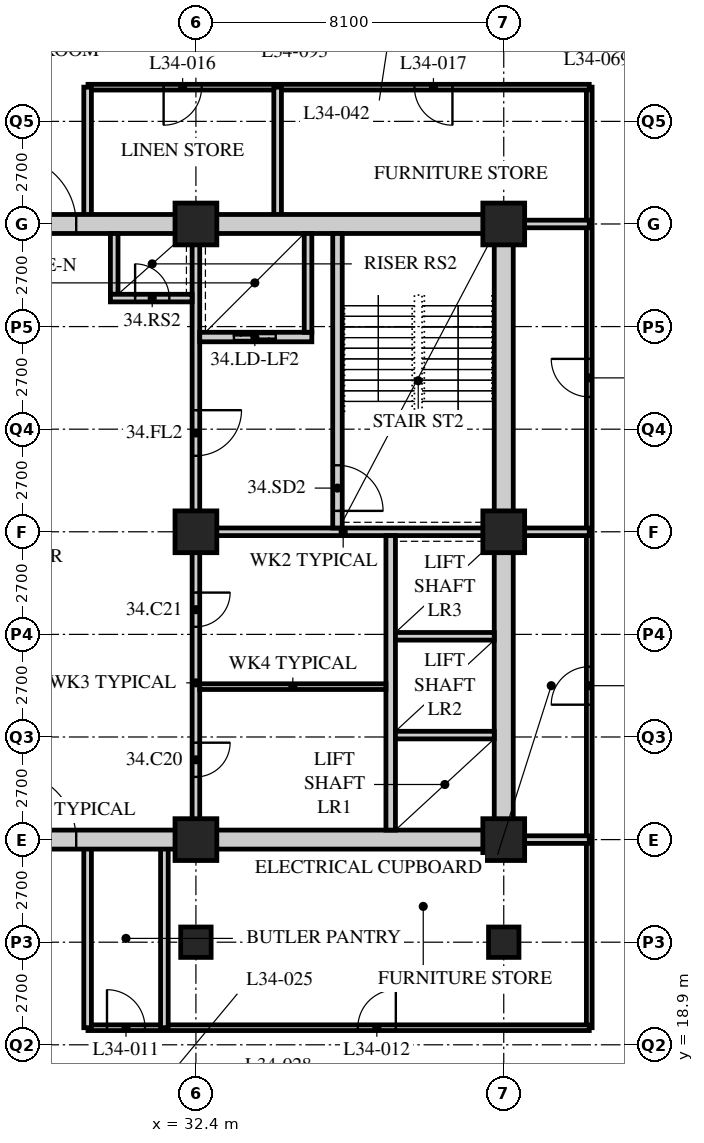
"""IFC4 building model, lengths in metres.
Left out: names, types, materials, properties, quantities, classifications, styles, units other than length and angle.
Written with IfcOpenShell. Run it as: python <this file> out.ifc"""

import sys

from ifc_helpers import new_model, si_unit, direction, frame, frame_2d, origin, origin_2d, place, context, subcontext, project, spatial, rectangle, hollow_rectangle, extrude, element, fill, save


model = new_model("IFC4")
c1 = context("Model", 3, precision=1e-05, world=origin(), true_north=direction((0.0, 1.0)))
c2 = subcontext(c1, "Body", "Model", "MODEL_VIEW")
j1 = project(units=[si_unit("LENGTHUNIT", "METRE"), si_unit("PLANEANGLEUNIT", "RADIAN")], contexts=[c1])
p1 = place(None, origin())
s1 = spatial("IfcSite", under=j1, at=p1, CompositionType="ELEMENT")
p2 = place(p1, origin())
s2 = spatial("IfcBuilding", under=s1, at=p2, CompositionType="ELEMENT")
p3 = place(p2, frame((0.0, 0.0, 134.0)))
s3 = spatial("IfcBuildingStorey", under=s2, at=p3, CompositionType="ELEMENT", Elevation=134.0)
p4 = place(p3, frame((32.4, 21.6, 0.0), z_axis=(0.0, 0.0, 1.0), x_axis=(1.0, 0.0, 0.0)))
e1 = element("IfcColumn", 1, at=p4, inside=s3, PredefinedType="COLUMN", context=c2, shape_type="SweptSolid", body=[
    extrude(hollow_rectangle(XDim=0.8, YDim=0.8, WallThickness=0.08, at=origin_2d()), origin(), (0.0, 0.0, 1.0), 3.4),
])
for number, where, z_axis, x_axis in (
    (2, (32.4, 24.3, 0.0), (0.0, 0.0, 1.0), (1.0, 0.0, 0.0)),
    (3, (32.4, 32.4, 0.0), (0.0, 0.0, 1.0), (1.0, 0.0, 0.0)),
    (4, (32.4, 40.5, 0.0), (0.0, 0.0, 1.0), (1.0, 0.0, 0.0)),
):
    element("IfcColumn", number, at=place(p3, frame(where, z_axis=z_axis, x_axis=x_axis)), inside=s3, PredefinedType="COLUMN", context=c2, shape_type="SweptSolid", body=[
        extrude(hollow_rectangle(XDim=1.1, YDim=1.1, WallThickness=0.1, at=origin_2d()), origin(), (0.0, 0.0, 1.0), 3.4),
    ])
p5 = place(p3, frame((40.5, 21.6, 0.0), z_axis=(0.0, 0.0, 1.0), x_axis=(1.0, 0.0, 0.0)))
e5 = element("IfcColumn", 5, at=p5, inside=s3, PredefinedType="COLUMN", context=c2, shape_type="SweptSolid", body=[
    extrude(hollow_rectangle(XDim=0.8, YDim=0.8, WallThickness=0.08, at=origin_2d()), origin(), (0.0, 0.0, 1.0), 3.4),
])
for number, where, z_axis, x_axis in (
    (6, (40.5, 24.3, 0.0), (0.0, 0.0, 1.0), (1.0, 0.0, 0.0)),
    (7, (40.5, 32.4, 0.0), (0.0, 0.0, 1.0), (1.0, 0.0, 0.0)),
    (8, (40.5, 40.5, 0.0), (0.0, 0.0, 1.0), (1.0, 0.0, 0.0)),
):
    element("IfcColumn", number, at=place(p3, frame(where, z_axis=z_axis, x_axis=x_axis)), inside=s3, PredefinedType="COLUMN", context=c2, shape_type="SweptSolid", body=[
        extrude(hollow_rectangle(XDim=1.1, YDim=1.1, WallThickness=0.1, at=origin_2d()), origin(), (0.0, 0.0, 1.0), 3.4),
    ])
p6 = place(p3, frame((42.75, 19.35, 0.0), z_axis=(0.0, 0.0, 1.0), x_axis=(0.0, 1.0, 0.0)))
e9 = element("IfcWall", 9, at=p6, inside=s3, PredefinedType="PARTITIONING", context=c2, shape_type="SweptSolid", body=[
    extrude(rectangle(XDim=24.75, YDim=0.15, at=frame_2d((12.375, 0.0))), origin(), (0.0, 0.0, 1.0), 3.19),
])
p7 = place(p6, frame((8.5, 0.0, 0.0)))
e10 = element("IfcOpeningElement", 10, at=p7, cuts=e9, PredefinedType="OPENING", context=c2, shape_type="SweptSolid", body=[
    extrude(rectangle(XDim=1.0, YDim=2.1, at=frame_2d((0.5, 1.05))), frame((0.0, 0.085, 0.0), z_axis=(0.0, -1.0, 0.0), x_axis=(1.0, 0.0, 0.0)), (0.0, 0.0, 1.0), 0.17),
])
p8 = place(p6, frame((16.6, 0.0, 0.0)))
e11 = element("IfcOpeningElement", 11, at=p8, cuts=e9, PredefinedType="OPENING", context=c2, shape_type="SweptSolid", body=[
    extrude(rectangle(XDim=1.0, YDim=2.1, at=frame_2d((0.5, 1.05))), frame((0.0, 0.085, 0.0), z_axis=(0.0, -1.0, 0.0), x_axis=(1.0, 0.0, 0.0)), (0.0, 0.0, 1.0), 0.17),
])
p9 = place(p3, frame((42.75, 44.1, 0.0), z_axis=(0.0, 0.0, 1.0), x_axis=(-1.0, 0.0, 0.0)))
e12 = element("IfcWall", 12, at=p9, inside=s3, PredefinedType="PARTITIONING", context=c2, shape_type="SweptSolid", body=[
    extrude(rectangle(XDim=13.19, YDim=0.15, at=frame_2d((6.595, 0.0))), origin(), (0.0, 0.0, 1.0), 3.19),
])
p10 = place(p9, frame((10.2, 0.0, 0.0)))
e13 = element("IfcOpeningElement", 13, at=p10, cuts=e12, PredefinedType="OPENING", context=c2, shape_type="SweptSolid", body=[
    extrude(rectangle(XDim=1.0, YDim=2.1, at=frame_2d((0.5, 1.05))), frame((0.0, 0.085, 0.0), z_axis=(0.0, -1.0, 0.0), x_axis=(1.0, 0.0, 0.0)), (0.0, 0.0, 1.0), 0.17),
])
p11 = place(p9, frame((3.6, 0.0, 0.0)))
e14 = element("IfcOpeningElement", 14, at=p11, cuts=e12, PredefinedType="OPENING", context=c2, shape_type="SweptSolid", body=[
    extrude(rectangle(XDim=1.0, YDim=2.1, at=frame_2d((0.5, 1.05))), frame((0.0, 0.085, 0.0), z_axis=(0.0, -1.0, 0.0), x_axis=(1.0, 0.0, 0.0)), (0.0, 0.0, 1.0), 0.17),
])
p12 = place(p3, frame((29.56, 19.35, 0.0), z_axis=(0.0, 0.0, 1.0), x_axis=(1.0, 0.0, 0.0)))
e15 = element("IfcWall", 15, at=p12, inside=s3, PredefinedType="PARTITIONING", context=c2, shape_type="SweptSolid", body=[
    extrude(rectangle(XDim=13.19, YDim=0.15, at=frame_2d((6.595, 0.0))), origin(), (0.0, 0.0, 1.0), 3.19),
])
p13 = place(p12, frame((0.5, 0.0, 0.0)))
e16 = element("IfcOpeningElement", 16, at=p13, cuts=e15, PredefinedType="OPENING", context=c2, shape_type="SweptSolid", body=[
    extrude(rectangle(XDim=1.0, YDim=2.1, at=frame_2d((0.5, 1.05))), frame((0.0, 0.085, 0.0), z_axis=(0.0, -1.0, 0.0), x_axis=(1.0, 0.0, 0.0)), (0.0, 0.0, 1.0), 0.17),
])
p14 = place(p12, frame((7.1, 0.0, 0.0)))
e17 = element("IfcOpeningElement", 17, at=p14, cuts=e15, PredefinedType="OPENING", context=c2, shape_type="SweptSolid", body=[
    extrude(rectangle(XDim=1.0, YDim=2.1, at=frame_2d((0.5, 1.05))), frame((0.0, 0.085, 0.0), z_axis=(0.0, -1.0, 0.0), x_axis=(1.0, 0.0, 0.0)), (0.0, 0.0, 1.0), 0.17),
])
p15 = place(p3, frame((40.5, 32.4, 0.0), z_axis=(0.0, 0.0, 1.0), x_axis=(1.0, 0.0, 0.0)))
e18 = element("IfcWall", 18, at=p15, inside=s3, PredefinedType="SOLIDWALL", context=c2, shape_type="SweptSolid", body=[
    extrude(rectangle(XDim=2.25, YDim=0.2, at=frame_2d((1.125, 0.0))), origin(), (0.0, 0.0, 1.0), 3.19),
])
for number, where, z_axis, x_axis in (
    (19, (31.57, 19.35, 0.0), (0.0, 0.0, 1.0), (0.0, 1.0, 0.0)),
    (20, (29.55, 19.35, 0.0), (0.0, 0.0, 1.0), (0.0, 1.0, 0.0)),
):
    element("IfcWall", number, at=place(p3, frame(where, z_axis=z_axis, x_axis=x_axis)), inside=s3, PredefinedType="SOLIDWALL", context=c2, shape_type="SweptSolid", body=[
        extrude(rectangle(XDim=4.95, YDim=0.2, at=frame_2d((2.475, 0.0))), origin(), (0.0, 0.0, 1.0), 3.19),
    ])
for number, where, z_axis, x_axis in (
    (21, (34.55, 44.1, 0.0), (0.0, 0.0, 1.0), (0.0, -1.0, 0.0)),
    (22, (29.55, 40.5, 0.0), (0.0, 0.0, 1.0), (0.0, 1.0, 0.0)),
):
    element("IfcWall", number, at=place(p3, frame(where, z_axis=z_axis, x_axis=x_axis)), inside=s3, PredefinedType="SOLIDWALL", context=c2, shape_type="SweptSolid", body=[
        extrude(rectangle(XDim=3.6, YDim=0.2, at=frame_2d((1.8, 0.0))), origin(), (0.0, 0.0, 1.0), 3.19),
    ])
for number, where, z_axis, x_axis in (
    (23, (40.5, 24.3, 0.0), (0.0, 0.0, 1.0), (1.0, 0.0, 0.0)),
    (24, (40.5, 40.5, 0.0), (0.0, 0.0, 1.0), (1.0, 0.0, 0.0)),
):
    element("IfcWall", number, at=place(p3, frame(where, z_axis=z_axis, x_axis=x_axis)), inside=s3, PredefinedType="SOLIDWALL", context=c2, shape_type="SweptSolid", body=[
        extrude(rectangle(XDim=2.25, YDim=0.2, at=frame_2d((1.125, 0.0))), origin(), (0.0, 0.0, 1.0), 3.19),
    ])
p16 = place(p3, frame((15.95, 24.3, 0.0), z_axis=(0.0, 0.0, 1.0), x_axis=(1.0, 0.0, 0.0)))
e25 = element("IfcWall", 25, at=p16, inside=s3, PredefinedType="SOLIDWALL", context=c2, shape_type="SweptSolid", body=[
    extrude(rectangle(XDim=24.8, YDim=0.5, at=frame_2d((12.4, 0.0))), origin(), (0.0, 0.0, 1.0), 2.54),
])
p17 = place(p16, frame((11.5, 0.0, 0.0)))
e26 = element("IfcOpeningElement", 26, at=p17, cuts=e25, PredefinedType="OPENING", context=c2, shape_type="SweptSolid", body=[
    extrude(rectangle(XDim=1.8, YDim=2.4, at=frame_2d((0.9, 1.2))), frame((0.0, 0.26, 0.0), z_axis=(0.0, -1.0, 0.0), x_axis=(1.0, 0.0, 0.0)), (0.0, 0.0, 1.0), 0.52),
])
p18 = place(p3, frame((15.95, 40.5, 0.0), z_axis=(0.0, 0.0, 1.0), x_axis=(1.0, 0.0, 0.0)))
e27 = element("IfcWall", 27, at=p18, inside=s3, PredefinedType="SOLIDWALL", context=c2, shape_type="SweptSolid", body=[
    extrude(rectangle(XDim=24.8, YDim=0.5, at=frame_2d((12.4, 0.0))), origin(), (0.0, 0.0, 1.0), 2.54),
])
p19 = place(p18, frame((11.5, 0.0, 0.0)))
e28 = element("IfcOpeningElement", 28, at=p19, cuts=e27, PredefinedType="OPENING", context=c2, shape_type="SweptSolid", body=[
    extrude(rectangle(XDim=1.8, YDim=2.4, at=frame_2d((0.9, 1.2))), frame((0.0, 0.26, 0.0), z_axis=(0.0, -1.0, 0.0), x_axis=(1.0, 0.0, 0.0)), (0.0, 0.0, 1.0), 0.52),
])
p20 = place(p3, frame((40.5, 24.55, 0.0), z_axis=(0.0, 0.0, 1.0), x_axis=(0.0, 1.0, 0.0)))
e29 = element("IfcWall", 29, at=p20, inside=s3, PredefinedType="SOLIDWALL", context=c2, shape_type="SweptSolid", body=[
    extrude(rectangle(XDim=15.7, YDim=0.5, at=frame_2d((7.85, 0.0))), origin(), (0.0, 0.0, 1.0), 2.578),
])
p21 = place(p3, frame((32.3, 32.4, 0.0), z_axis=(0.0, 0.0, 1.0), x_axis=(1.0, 0.0, 0.0)))
e30 = element("IfcWall", 30, at=p21, inside=s3, PredefinedType="SOLIDWALL", context=c2, shape_type="SweptSolid", body=[
    extrude(rectangle(XDim=7.95, YDim=0.2, at=frame_2d((3.975, 0.0))), origin(), (0.0, 0.0, 1.0), 2.578),
])
p22 = place(p3, frame((32.4, 32.5, 0.0), z_axis=(0.0, 0.0, 1.0), x_axis=(0.0, 1.0, 0.0)))
e31 = element("IfcWall", 31, at=p22, inside=s3, PredefinedType="SOLIDWALL", context=c2, shape_type="SweptSolid", body=[
    extrude(rectangle(XDim=7.75, YDim=0.2, at=frame_2d((3.875, 0.0))), origin(), (0.0, 0.0, 1.0), 2.578),
])
p23 = place(p22, frame((1.9, 0.0, 0.0)))
e32 = element("IfcOpeningElement", 32, at=p23, cuts=e31, PredefinedType="OPENING", context=c2, shape_type="SweptSolid", body=[
    extrude(rectangle(XDim=1.2, YDim=2.1, at=frame_2d((0.6, 1.05))), frame((0.0, 0.11, 0.0), z_axis=(0.0, -1.0, 0.0), x_axis=(1.0, 0.0, 0.0)), (0.0, 0.0, 1.0), 0.22),
])
p24 = place(p3, frame((37.525, 24.55, 0.0), z_axis=(0.0, 0.0, 1.0), x_axis=(0.0, 1.0, 0.0)))
e33 = element("IfcWall", 33, at=p24, inside=s3, PredefinedType="SOLIDWALL", context=c2, shape_type="SweptSolid", body=[
    extrude(rectangle(XDim=7.75, YDim=0.25, at=frame_2d((3.875, 0.0))), origin(), (0.0, 0.0, 1.0), 3.19),
])
for number, where, z_axis, x_axis in (
    (34, (37.65, 27.05, 0.0), (0.0, 0.0, 1.0), (1.0, 0.0, 0.0)),
    (35, (37.65, 29.65, 0.0), (0.0, 0.0, 1.0), (1.0, 0.0, 0.0)),
):
    element("IfcWall", number, at=place(p3, frame(where, z_axis=z_axis, x_axis=x_axis)), inside=s3, PredefinedType="SOLIDWALL", context=c2, shape_type="SweptSolid", body=[
        extrude(rectangle(XDim=2.6, YDim=0.2, at=frame_2d((1.3, 0.0))), origin(), (0.0, 0.0, 1.0), 3.19),
    ])
p25 = place(p3, frame((36.125, 32.5, 0.0), z_axis=(0.0, 0.0, 1.0), x_axis=(0.0, 1.0, 0.0)))
e36 = element("IfcWall", 36, at=p25, inside=s3, PredefinedType="SOLIDWALL", context=c2, shape_type="SweptSolid", body=[
    extrude(rectangle(XDim=7.75, YDim=0.25, at=frame_2d((3.875, 0.0))), origin(), (0.0, 0.0, 1.0), 3.19),
])
p26 = place(p25, frame((0.45, 0.0, 0.0)))
e37 = element("IfcOpeningElement", 37, at=p26, cuts=e36, PredefinedType="OPENING", context=c2, shape_type="SweptSolid", body=[
    extrude(rectangle(XDim=1.2, YDim=2.1, at=frame_2d((0.6, 1.05))), frame((0.0, 0.135, 0.0), z_axis=(0.0, -1.0, 0.0), x_axis=(1.0, 0.0, 0.0)), (0.0, 0.0, 1.0), 0.27),
])
p27 = place(p3, frame((32.5, 37.525, 0.0), z_axis=(0.0, 0.0, 1.0), x_axis=(1.0, 0.0, 0.0)))
e38 = element("IfcWall", 38, at=p27, inside=s3, PredefinedType="SOLIDWALL", context=c2, shape_type="SweptSolid", body=[
    extrude(rectangle(XDim=2.95, YDim=0.25, at=frame_2d((1.475, 0.0))), origin(), (0.0, 0.0, 1.0), 3.19),
])
p28 = place(p27, frame((0.9, 0.0, 0.0)))
e39 = element("IfcOpeningElement", 39, at=p28, cuts=e38, PredefinedType="OPENING", context=c2, shape_type="SweptSolid", body=[
    extrude(rectangle(XDim=1.1, YDim=2.4, at=frame_2d((0.55, 1.2))), frame((0.0, 0.135, 0.0), z_axis=(0.0, -1.0, 0.0), x_axis=(1.0, 0.0, 0.0)), (0.0, 0.0, 1.0), 0.27),
])
p29 = place(p3, frame((35.35, 37.65, 0.0), z_axis=(0.0, 0.0, 1.0), x_axis=(0.0, 1.0, 0.0)))
e40 = element("IfcWall", 40, at=p29, inside=s3, PredefinedType="SOLIDWALL", context=c2, shape_type="SweptSolid", body=[
    extrude(rectangle(XDim=2.6, YDim=0.2, at=frame_2d((1.3, 0.0))), origin(), (0.0, 0.0, 1.0), 3.19),
])
p30 = place(p3, frame((30.25, 38.65, 0.0), z_axis=(0.0, 0.0, 1.0), x_axis=(0.0, 1.0, 0.0)))
e41 = element("IfcWall", 41, at=p30, inside=s3, PredefinedType="SOLIDWALL", context=c2, shape_type="SweptSolid", body=[
    extrude(rectangle(XDim=1.6, YDim=0.2, at=frame_2d((0.8, 0.0))), origin(), (0.0, 0.0, 1.0), 3.19),
])
p31 = place(p3, frame((30.15, 38.55, 0.0), z_axis=(0.0, 0.0, 1.0), x_axis=(1.0, 0.0, 0.0)))
e42 = element("IfcWall", 42, at=p31, inside=s3, PredefinedType="SOLIDWALL", context=c2, shape_type="SweptSolid", body=[
    extrude(rectangle(XDim=2.15, YDim=0.2, at=frame_2d((1.075, 0.0))), origin(), (0.0, 0.0, 1.0), 3.19),
])
p32 = place(p31, frame((0.65, 0.0, 0.0)))
e43 = element("IfcOpeningElement", 43, at=p32, cuts=e42, PredefinedType="OPENING", context=c2, shape_type="SweptSolid", body=[
    extrude(rectangle(XDim=0.9, YDim=2.1, at=frame_2d((0.45, 1.05))), frame((0.0, 0.11, 0.0), z_axis=(0.0, -1.0, 0.0), x_axis=(1.0, 0.0, 0.0)), (0.0, 0.0, 1.0), 0.22),
])
p33 = place(p3, frame((32.4, 24.55, 0.0), z_axis=(0.0, 0.0, 1.0), x_axis=(0.0, 1.0, 0.0)))
e44 = element("IfcWall", 44, at=p33, inside=s3, PredefinedType="PARTITIONING", context=c2, shape_type="SweptSolid", body=[
    extrude(rectangle(XDim=7.75, YDim=0.2, at=frame_2d((3.875, 0.0))), origin(), (0.0, 0.0, 1.0), 2.578),
])
p34 = place(p33, frame((1.4, 0.0, 0.0)))
e45 = element("IfcOpeningElement", 45, at=p34, cuts=e44, PredefinedType="OPENING", context=c2, shape_type="SweptSolid", body=[
    extrude(rectangle(XDim=0.9, YDim=2.1, at=frame_2d((0.45, 1.05))), frame((0.0, 0.11, 0.0), z_axis=(0.0, -1.0, 0.0), x_axis=(1.0, 0.0, 0.0)), (0.0, 0.0, 1.0), 0.22),
])
p35 = place(p33, frame((5.35, 0.0, 0.0)))
e46 = element("IfcOpeningElement", 46, at=p35, cuts=e44, PredefinedType="OPENING", context=c2, shape_type="SweptSolid", body=[
    extrude(rectangle(XDim=0.9, YDim=2.1, at=frame_2d((0.45, 1.05))), frame((0.0, 0.11, 0.0), z_axis=(0.0, -1.0, 0.0), x_axis=(1.0, 0.0, 0.0)), (0.0, 0.0, 1.0), 0.22),
])
p36 = place(p3, frame((32.5, 28.325, 0.0), z_axis=(0.0, 0.0, 1.0), x_axis=(1.0, 0.0, 0.0)))
e47 = element("IfcWall", 47, at=p36, inside=s3, PredefinedType="PARTITIONING", context=c2, shape_type="SweptSolid", body=[
    extrude(rectangle(XDim=4.9, YDim=0.15, at=frame_2d((2.45, 0.0))), origin(), (0.0, 0.0, 1.0), 3.19),
])
p37 = place(p7, origin())
e48 = element("IfcDoor", 48, at=p37, inside=s3, OperationType="SINGLE_SWING_LEFT", PredefinedType="DOOR", context=c2, shape_type="SweptSolid", body=[
    extrude(rectangle(XDim=1.0, YDim=2.1, at=frame_2d((0.5, 1.05))), frame((0.0, 0.025, 0.0), z_axis=(0.0, -1.0, 0.0), x_axis=(1.0, 0.0, 0.0)), (0.0, 0.0, 1.0), 0.05),
])
fill(e10, e48)
p38 = place(p8, origin())
e49 = element("IfcDoor", 49, at=p38, inside=s3, OperationType="SINGLE_SWING_RIGHT", PredefinedType="DOOR", context=c2, shape_type="SweptSolid", body=[
    extrude(rectangle(XDim=1.0, YDim=2.1, at=frame_2d((0.5, 1.05))), frame((0.0, 0.025, 0.0), z_axis=(0.0, -1.0, 0.0), x_axis=(1.0, 0.0, 0.0)), (0.0, 0.0, 1.0), 0.05),
])
fill(e11, e49)
p39 = place(p13, origin())
e50 = element("IfcDoor", 50, at=p39, inside=s3, OperationType="SINGLE_SWING_LEFT", PredefinedType="DOOR", context=c2, shape_type="SweptSolid", body=[
    extrude(rectangle(XDim=1.0, YDim=2.1, at=frame_2d((0.5, 1.05))), frame((0.0, 0.025, 0.0), z_axis=(0.0, -1.0, 0.0), x_axis=(1.0, 0.0, 0.0)), (0.0, 0.0, 1.0), 0.05),
])
fill(e16, e50)
p40 = place(p14, origin())
e51 = element("IfcDoor", 51, at=p40, inside=s3, OperationType="SINGLE_SWING_RIGHT", PredefinedType="DOOR", context=c2, shape_type="SweptSolid", body=[
    extrude(rectangle(XDim=1.0, YDim=2.1, at=frame_2d((0.5, 1.05))), frame((0.0, 0.025, 0.0), z_axis=(0.0, -1.0, 0.0), x_axis=(1.0, 0.0, 0.0)), (0.0, 0.0, 1.0), 0.05),
])
fill(e17, e51)
p41 = place(p10, origin())
e52 = element("IfcDoor", 52, at=p41, inside=s3, OperationType="SINGLE_SWING_RIGHT", PredefinedType="DOOR", context=c2, shape_type="SweptSolid", body=[
    extrude(rectangle(XDim=1.0, YDim=2.1, at=frame_2d((0.5, 1.05))), frame((0.0, 0.025, 0.0), z_axis=(0.0, -1.0, 0.0), x_axis=(1.0, 0.0, 0.0)), (0.0, 0.0, 1.0), 0.05),
])
fill(e13, e52)
p42 = place(p11, origin())
e53 = element("IfcDoor", 53, at=p42, inside=s3, OperationType="SINGLE_SWING_LEFT", PredefinedType="DOOR", context=c2, shape_type="SweptSolid", body=[
    extrude(rectangle(XDim=1.0, YDim=2.1, at=frame_2d((0.5, 1.05))), frame((0.0, 0.025, 0.0), z_axis=(0.0, -1.0, 0.0), x_axis=(1.0, 0.0, 0.0)), (0.0, 0.0, 1.0), 0.05),
])
fill(e14, e53)
p43 = place(p34, origin())
e54 = element("IfcDoor", 54, at=p43, inside=s3, OperationType="SINGLE_SWING_LEFT", PredefinedType="DOOR", context=c2, shape_type="SweptSolid", body=[
    extrude(rectangle(XDim=0.9, YDim=2.1, at=frame_2d((0.45, 1.05))), frame((0.0, 0.025, 0.0), z_axis=(0.0, -1.0, 0.0), x_axis=(1.0, 0.0, 0.0)), (0.0, 0.0, 1.0), 0.05),
])
fill(e45, e54)
p44 = place(p35, origin())
e55 = element("IfcDoor", 55, at=p44, inside=s3, OperationType="SINGLE_SWING_LEFT", PredefinedType="DOOR", context=c2, shape_type="SweptSolid", body=[
    extrude(rectangle(XDim=0.9, YDim=2.1, at=frame_2d((0.45, 1.05))), frame((0.0, 0.025, 0.0), z_axis=(0.0, -1.0, 0.0), x_axis=(1.0, 0.0, 0.0)), (0.0, 0.0, 1.0), 0.05),
])
fill(e46, e55)
p45 = place(p26, origin())
e56 = element("IfcDoor", 56, at=p45, inside=s3, OperationType="SINGLE_SWING_RIGHT", PredefinedType="DOOR", context=c2, shape_type="SweptSolid", body=[
    extrude(rectangle(XDim=1.2, YDim=2.1, at=frame_2d((0.6, 1.05))), frame((0.0, 0.025, 0.0), z_axis=(0.0, -1.0, 0.0), x_axis=(1.0, 0.0, 0.0)), (0.0, 0.0, 1.0), 0.05),
])
fill(e37, e56)
p46 = place(p23, origin())
e57 = element("IfcDoor", 57, at=p46, inside=s3, OperationType="SINGLE_SWING_LEFT", PredefinedType="DOOR", context=c2, shape_type="SweptSolid", body=[
    extrude(rectangle(XDim=1.2, YDim=2.1, at=frame_2d((0.6, 1.05))), frame((0.0, 0.025, 0.0), z_axis=(0.0, -1.0, 0.0), x_axis=(1.0, 0.0, 0.0)), (0.0, 0.0, 1.0), 0.05),
])
fill(e32, e57)
p47 = place(p32, origin())
e58 = element("IfcDoor", 58, at=p47, inside=s3, OperationType="SINGLE_SWING_LEFT", PredefinedType="DOOR", context=c2, shape_type="SweptSolid", body=[
    extrude(rectangle(XDim=0.9, YDim=2.1, at=frame_2d((0.45, 1.05))), frame((0.0, 0.025, 0.0), z_axis=(0.0, -1.0, 0.0), x_axis=(1.0, 0.0, 0.0)), (0.0, 0.0, 1.0), 0.05),
])
fill(e43, e58)
p48 = place(p28, origin())
e59 = element("IfcDoor", 59, at=p48, inside=s3, OperationType="DOUBLE_DOOR_SLIDING", PredefinedType="DOOR", context=c2, shape_type="SweptSolid", body=[
    extrude(rectangle(XDim=1.1, YDim=2.4, at=frame_2d((0.55, 1.2))), frame((0.0, 0.025, 0.0), z_axis=(0.0, -1.0, 0.0), x_axis=(1.0, 0.0, 0.0)), (0.0, 0.0, 1.0), 0.05),
])
fill(e39, e59)
p49 = place(p17, origin())
e60 = element("IfcDoor", 60, at=p49, inside=s3, OperationType="DOUBLE_DOOR_SINGLE_SWING", PredefinedType="DOOR", context=c2, shape_type="SweptSolid", body=[
    extrude(rectangle(XDim=1.8, YDim=2.4, at=frame_2d((0.9, 1.2))), frame((0.0, 0.025, 0.0), z_axis=(0.0, -1.0, 0.0), x_axis=(1.0, 0.0, 0.0)), (0.0, 0.0, 1.0), 0.05),
])
fill(e26, e60)
p50 = place(p19, origin())
e61 = element("IfcDoor", 61, at=p50, inside=s3, OperationType="DOUBLE_DOOR_SINGLE_SWING", PredefinedType="DOOR", context=c2, shape_type="SweptSolid", body=[
    extrude(rectangle(XDim=1.8, YDim=2.4, at=frame_2d((0.9, 1.2))), frame((0.0, 0.025, 0.0), z_axis=(0.0, -1.0, 0.0), x_axis=(1.0, 0.0, 0.0)), (0.0, 0.0, 1.0), 0.05),
])
fill(e28, e61)
save(model, sys.argv[1])
